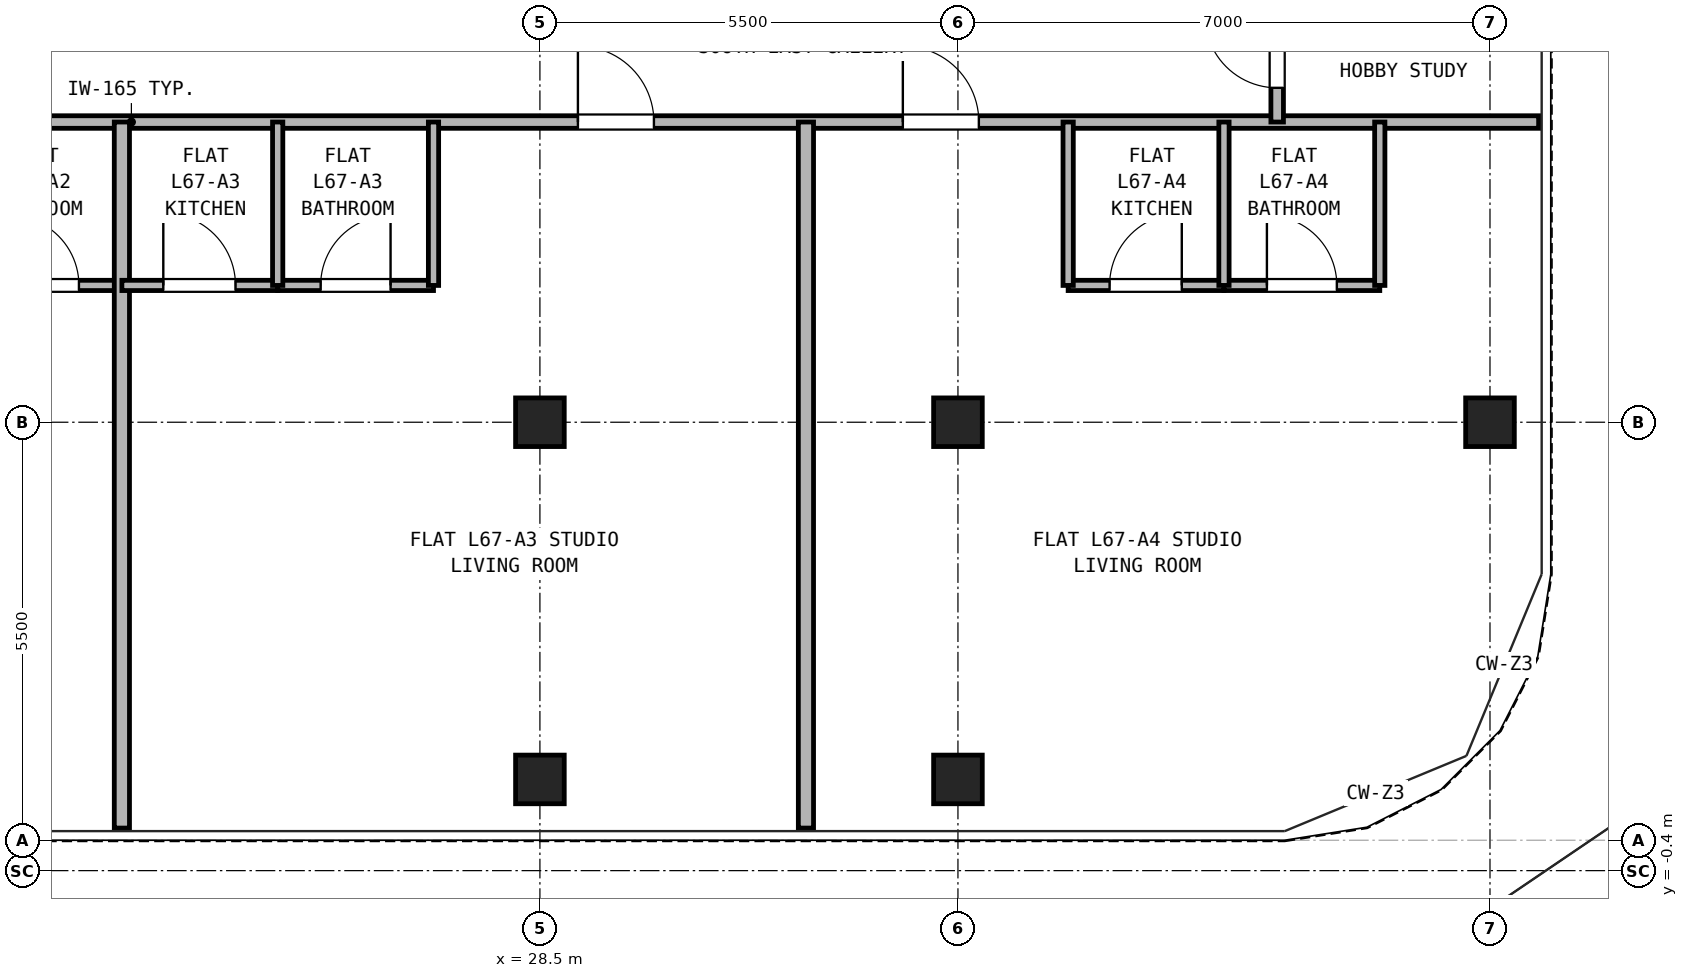
"""IFC4 building model, lengths in metres.
Left out: names, types, materials, properties, quantities, classifications, styles, units other than length and angle.
Written with IfcOpenShell. Run it as: python <this file> out.ifc"""

import sys

from ifc_helpers import new_model, si_unit, direction, frame, frame_2d, origin, origin_2d, place, context, subcontext, project, spatial, rectangle, hollow_rectangle, extrude, source, transform, mapped, element, fill, save


model = new_model("IFC4")
c1 = context("Model", 3, precision=1e-05, world=origin(), true_north=direction((0.0, 1.0)))
c2 = subcontext(c1, "Body", "Model", "MODEL_VIEW")
j1 = project(units=[si_unit("LENGTHUNIT", "METRE"), si_unit("PLANEANGLEUNIT", "RADIAN")], contexts=[c1])
p1 = place(None, origin())
s1 = spatial("IfcSite", under=j1, at=p1, CompositionType="ELEMENT")
p2 = place(p1, origin())
s2 = spatial("IfcBuilding", under=s1, at=p2, CompositionType="ELEMENT")
p3 = place(p2, frame((0.0, 0.0, 236.1)))
s3 = spatial("IfcBuildingStorey", under=s2, at=p3, CompositionType="ELEMENT", Elevation=236.1)
m1 = source(origin(), c2, "Body", "SweptSolid", [
    extrude(hollow_rectangle(XDim=0.64, YDim=0.64, WallThickness=0.035, at=origin_2d()), origin(), (0.0, 0.0, 1.0), 2.98),
])
for number, where, z_axis, x_axis in (
    (1, (28.5, 0.8, 0.0), (0.0, 0.0, 1.0), (1.0, 0.0, 0.0)),
    (2, (34.0, 0.8, 0.0), (0.0, 0.0, 1.0), (1.0, 0.0, 0.0)),
    (3, (41.0, 5.5, 0.0), (0.0, 0.0, 1.0), (1.0, 0.0, 0.0)),
    (4, (28.5, 5.5, 0.0), (0.0, 0.0, 1.0), (1.0, 0.0, 0.0)),
    (5, (34.0, 5.5, 0.0), (0.0, 0.0, 1.0), (1.0, 0.0, 0.0)),
):
    element("IfcColumn", number, at=place(p3, frame(where, z_axis=z_axis, x_axis=x_axis)), inside=s3, PredefinedType="COLUMN", context=c2, shape_type="MappedRepresentation", body=[
        mapped(m1, transform((0.0, 0.0, 0.0), x_axis=(1.0, 0.0, 0.0), y_axis=(0.0, 1.0, 0.0), z_axis=(0.0, 0.0, 1.0), scale=1.0)),
    ])
p4 = place(p3, frame((5.36, 9.45, 0.0), z_axis=(0.0, 0.0, 1.0), x_axis=(1.0, 0.0, 0.0)))
e6 = element("IfcWall", 6, at=p4, inside=s3, PredefinedType="PARTITIONING", context=c2, shape_type="SweptSolid", body=[
    extrude(rectangle(XDim=36.28, YDim=0.165, at=frame_2d((18.14, 0.0))), origin(), (0.0, 0.0, 1.0), 2.98),
])
p5 = place(p4, frame((7.115, 0.0, 0.0)))
e7 = element("IfcOpeningElement", 7, at=p5, cuts=e6, PredefinedType="OPENING", context=c2, shape_type="SweptSolid", body=[
    extrude(rectangle(XDim=1.0, YDim=2.15, at=frame_2d((0.5, 1.075))), frame((0.0, 0.093, 0.0), z_axis=(0.0, -1.0, 0.0), x_axis=(1.0, 0.0, 0.0)), (0.0, 0.0, 1.0), 0.185),
])
p6 = place(p4, frame((10.89, 0.0, 0.0)))
e8 = element("IfcOpeningElement", 8, at=p6, cuts=e6, PredefinedType="OPENING", context=c2, shape_type="SweptSolid", body=[
    extrude(rectangle(XDim=1.0, YDim=2.15, at=frame_2d((0.5, 1.075))), frame((0.0, 0.093, 0.0), z_axis=(0.0, -1.0, 0.0), x_axis=(1.0, 0.0, 0.0)), (0.0, 0.0, 1.0), 0.185),
])
p7 = place(p4, frame((23.64, 0.0, 0.0)))
e9 = element("IfcOpeningElement", 9, at=p7, cuts=e6, PredefinedType="OPENING", context=c2, shape_type="SweptSolid", body=[
    extrude(rectangle(XDim=1.0, YDim=2.15, at=frame_2d((0.5, 1.075))), frame((0.0, 0.093, 0.0), z_axis=(0.0, -1.0, 0.0), x_axis=(1.0, 0.0, 0.0)), (0.0, 0.0, 1.0), 0.185),
])
p8 = place(p4, frame((27.915, 0.0, 0.0)))
e10 = element("IfcOpeningElement", 10, at=p8, cuts=e6, PredefinedType="OPENING", context=c2, shape_type="SweptSolid", body=[
    extrude(rectangle(XDim=1.0, YDim=2.15, at=frame_2d((0.5, 1.075))), frame((0.0, 0.093, 0.0), z_axis=(0.0, -1.0, 0.0), x_axis=(1.0, 0.0, 0.0)), (0.0, 0.0, 1.0), 0.185),
])
p9 = place(p3, frame((38.2, 9.45, 0.0), z_axis=(0.0, 0.0, 1.0), x_axis=(0.0, 1.0, 0.0)))
e11 = element("IfcWall", 11, at=p9, inside=s3, PredefinedType="PARTITIONING", context=c2, shape_type="SweptSolid", body=[
    extrude(rectangle(XDim=2.0, YDim=0.165, at=frame_2d((1.0, 0.0))), origin(), (0.0, 0.0, 1.0), 2.98),
])
p10 = place(p9, frame((0.45, 0.0, 0.0)))
e12 = element("IfcOpeningElement", 12, at=p10, cuts=e11, PredefinedType="OPENING", context=c2, shape_type="SweptSolid", body=[
    extrude(rectangle(XDim=0.95, YDim=2.15, at=frame_2d((0.475, 1.075))), frame((0.0, 0.093, 0.0), z_axis=(0.0, -1.0, 0.0), x_axis=(1.0, 0.0, 0.0)), (0.0, 0.0, 1.0), 0.185),
])
p11 = place(p3, frame((20.95, 7.3, 0.0), z_axis=(0.0, 0.0, 1.0), x_axis=(1.0, 0.0, 0.0)))
e13 = element("IfcWall", 13, at=p11, inside=s3, PredefinedType="PARTITIONING", context=c2, shape_type="SweptSolid", body=[
    extrude(rectangle(XDim=2.05, YDim=0.135, at=frame_2d((1.025, 0.0))), origin(), (0.0, 0.0, 1.0), 2.98),
])
p12 = place(p11, frame((0.565, 0.0, 0.0)))
e14 = element("IfcOpeningElement", 14, at=p12, cuts=e13, PredefinedType="OPENING", context=c2, shape_type="SweptSolid", body=[
    extrude(rectangle(XDim=0.92, YDim=2.1, at=frame_2d((0.46, 1.05))), frame((0.0, 0.077, 0.0), z_axis=(0.0, -1.0, 0.0), x_axis=(1.0, 0.0, 0.0)), (0.0, 0.0, 1.0), 0.155),
])
p13 = place(p3, frame((23.0, 0.16, 0.0), z_axis=(0.0, 0.0, 1.0), x_axis=(0.0, 1.0, 0.0)))
e15 = element("IfcWall", 15, at=p13, inside=s3, PredefinedType="PARTITIONING", context=c2, shape_type="SweptSolid", body=[
    extrude(rectangle(XDim=9.29, YDim=0.2, at=frame_2d((4.645, 0.0))), origin(), (0.0, 0.0, 1.0), 2.98),
])
p14 = place(p3, frame((23.0, 7.3, 0.0), z_axis=(0.0, 0.0, 1.0), x_axis=(1.0, 0.0, 0.0)))
e16 = element("IfcWall", 16, at=p14, inside=s3, PredefinedType="PARTITIONING", context=c2, shape_type="SweptSolid", body=[
    extrude(rectangle(XDim=2.05, YDim=0.135, at=frame_2d((1.025, 0.0))), origin(), (0.0, 0.0, 1.0), 2.98),
])
p15 = place(p14, frame((0.545, 0.0, 0.0)))
e17 = element("IfcOpeningElement", 17, at=p15, cuts=e16, PredefinedType="OPENING", context=c2, shape_type="SweptSolid", body=[
    extrude(rectangle(XDim=0.95, YDim=2.15, at=frame_2d((0.475, 1.075))), frame((0.0, 0.077, 0.0), z_axis=(0.0, -1.0, 0.0), x_axis=(1.0, 0.0, 0.0)), (0.0, 0.0, 1.0), 0.155),
])
p16 = place(p3, frame((25.05, 7.3, 0.0), z_axis=(0.0, 0.0, 1.0), x_axis=(1.0, 0.0, 0.0)))
e18 = element("IfcWall", 18, at=p16, inside=s3, PredefinedType="PARTITIONING", context=c2, shape_type="SweptSolid", body=[
    extrude(rectangle(XDim=2.05, YDim=0.135, at=frame_2d((1.025, 0.0))), origin(), (0.0, 0.0, 1.0), 2.98),
])
p17 = place(p16, frame((0.565, 0.0, 0.0)))
e19 = element("IfcOpeningElement", 19, at=p17, cuts=e18, PredefinedType="OPENING", context=c2, shape_type="SweptSolid", body=[
    extrude(rectangle(XDim=0.92, YDim=2.1, at=frame_2d((0.46, 1.05))), frame((0.0, 0.077, 0.0), z_axis=(0.0, -1.0, 0.0), x_axis=(1.0, 0.0, 0.0)), (0.0, 0.0, 1.0), 0.155),
])
for number, where, z_axis, x_axis in (
    (20, (25.05, 7.3, 0.0), (0.0, 0.0, 1.0), (0.0, 1.0, 0.0)),
    (21, (27.1, 7.3, 0.0), (0.0, 0.0, 1.0), (0.0, 1.0, 0.0)),
):
    element("IfcWall", number, at=place(p3, frame(where, z_axis=z_axis, x_axis=x_axis)), inside=s3, PredefinedType="PARTITIONING", context=c2, shape_type="SweptSolid", body=[
        extrude(rectangle(XDim=2.15, YDim=0.135, at=frame_2d((1.075, 0.0))), origin(), (0.0, 0.0, 1.0), 2.98),
    ])
p18 = place(p3, frame((32.0, 0.16, 0.0), z_axis=(0.0, 0.0, 1.0), x_axis=(0.0, 1.0, 0.0)))
e22 = element("IfcWall", 22, at=p18, inside=s3, PredefinedType="PARTITIONING", context=c2, shape_type="SweptSolid", body=[
    extrude(rectangle(XDim=9.29, YDim=0.2, at=frame_2d((4.645, 0.0))), origin(), (0.0, 0.0, 1.0), 2.98),
])
p19 = place(p3, frame((35.45, 7.3, 0.0), z_axis=(0.0, 0.0, 1.0), x_axis=(1.0, 0.0, 0.0)))
e23 = element("IfcWall", 23, at=p19, inside=s3, PredefinedType="PARTITIONING", context=c2, shape_type="SweptSolid", body=[
    extrude(rectangle(XDim=2.05, YDim=0.135, at=frame_2d((1.025, 0.0))), origin(), (0.0, 0.0, 1.0), 2.98),
])
p20 = place(p19, frame((0.545, 0.0, 0.0)))
e24 = element("IfcOpeningElement", 24, at=p20, cuts=e23, PredefinedType="OPENING", context=c2, shape_type="SweptSolid", body=[
    extrude(rectangle(XDim=0.95, YDim=2.15, at=frame_2d((0.475, 1.075))), frame((0.0, 0.077, 0.0), z_axis=(0.0, -1.0, 0.0), x_axis=(1.0, 0.0, 0.0)), (0.0, 0.0, 1.0), 0.155),
])
p21 = place(p3, frame((37.5, 7.3, 0.0), z_axis=(0.0, 0.0, 1.0), x_axis=(1.0, 0.0, 0.0)))
e25 = element("IfcWall", 25, at=p21, inside=s3, PredefinedType="PARTITIONING", context=c2, shape_type="SweptSolid", body=[
    extrude(rectangle(XDim=2.05, YDim=0.135, at=frame_2d((1.025, 0.0))), origin(), (0.0, 0.0, 1.0), 2.98),
])
p22 = place(p21, frame((0.565, 0.0, 0.0)))
e26 = element("IfcOpeningElement", 26, at=p22, cuts=e25, PredefinedType="OPENING", context=c2, shape_type="SweptSolid", body=[
    extrude(rectangle(XDim=0.92, YDim=2.1, at=frame_2d((0.46, 1.05))), frame((0.0, 0.077, 0.0), z_axis=(0.0, -1.0, 0.0), x_axis=(1.0, 0.0, 0.0)), (0.0, 0.0, 1.0), 0.155),
])
for number, where, z_axis, x_axis in (
    (27, (35.45, 7.3, 0.0), (0.0, 0.0, 1.0), (0.0, 1.0, 0.0)),
    (28, (37.5, 7.3, 0.0), (0.0, 0.0, 1.0), (0.0, 1.0, 0.0)),
    (29, (39.55, 7.3, 0.0), (0.0, 0.0, 1.0), (0.0, 1.0, 0.0)),
):
    element("IfcWall", number, at=place(p3, frame(where, z_axis=z_axis, x_axis=x_axis)), inside=s3, PredefinedType="PARTITIONING", context=c2, shape_type="SweptSolid", body=[
        extrude(rectangle(XDim=2.15, YDim=0.135, at=frame_2d((1.075, 0.0))), origin(), (0.0, 0.0, 1.0), 2.98),
    ])
p23 = place(p12, origin())
e30 = element("IfcDoor", 30, at=p23, inside=s3, OperationType="SINGLE_SWING_LEFT", PredefinedType="DOOR", context=c2, shape_type="SweptSolid", body=[
    extrude(rectangle(XDim=0.92, YDim=2.1, at=frame_2d((0.46, 1.05))), frame((0.0, 0.025, 0.0), z_axis=(0.0, -1.0, 0.0), x_axis=(1.0, 0.0, 0.0)), (0.0, 0.0, 1.0), 0.05),
])
fill(e14, e30)
p24 = place(p15, origin())
e31 = element("IfcDoor", 31, at=p24, inside=s3, OperationType="SINGLE_SWING_LEFT", PredefinedType="DOOR", context=c2, shape_type="SweptSolid", body=[
    extrude(rectangle(XDim=0.95, YDim=2.15, at=frame_2d((0.475, 1.075))), frame((0.0, 0.025, 0.0), z_axis=(0.0, -1.0, 0.0), x_axis=(1.0, 0.0, 0.0)), (0.0, 0.0, 1.0), 0.05),
])
fill(e17, e31)
p25 = place(p17, origin())
e32 = element("IfcDoor", 32, at=p25, inside=s3, OperationType="SINGLE_SWING_RIGHT", PredefinedType="DOOR", context=c2, shape_type="SweptSolid", body=[
    extrude(rectangle(XDim=0.92, YDim=2.1, at=frame_2d((0.46, 1.05))), frame((0.0, 0.025, 0.0), z_axis=(0.0, -1.0, 0.0), x_axis=(1.0, 0.0, 0.0)), (0.0, 0.0, 1.0), 0.05),
])
fill(e19, e32)
p26 = place(p7, frame((1.0, 0.0, 0.0), z_axis=(0.0, 0.0, 1.0), x_axis=(-1.0, 0.0, 0.0)))
e33 = element("IfcDoor", 33, at=p26, inside=s3, OperationType="SINGLE_SWING_LEFT", PredefinedType="DOOR", context=c2, shape_type="SweptSolid", body=[
    extrude(rectangle(XDim=1.0, YDim=2.15, at=frame_2d((0.5, 1.075))), frame((0.0, 0.025, 0.0), z_axis=(0.0, -1.0, 0.0), x_axis=(1.0, 0.0, 0.0)), (0.0, 0.0, 1.0), 0.05),
])
fill(e9, e33)
p27 = place(p20, origin())
e34 = element("IfcDoor", 34, at=p27, inside=s3, OperationType="SINGLE_SWING_RIGHT", PredefinedType="DOOR", context=c2, shape_type="SweptSolid", body=[
    extrude(rectangle(XDim=0.95, YDim=2.15, at=frame_2d((0.475, 1.075))), frame((0.0, 0.025, 0.0), z_axis=(0.0, -1.0, 0.0), x_axis=(1.0, 0.0, 0.0)), (0.0, 0.0, 1.0), 0.05),
])
fill(e24, e34)
p28 = place(p22, origin())
e35 = element("IfcDoor", 35, at=p28, inside=s3, OperationType="SINGLE_SWING_LEFT", PredefinedType="DOOR", context=c2, shape_type="SweptSolid", body=[
    extrude(rectangle(XDim=0.92, YDim=2.1, at=frame_2d((0.46, 1.05))), frame((0.0, 0.025, 0.0), z_axis=(0.0, -1.0, 0.0), x_axis=(1.0, 0.0, 0.0)), (0.0, 0.0, 1.0), 0.05),
])
fill(e26, e35)
p29 = place(p8, frame((1.0, 0.0, 0.0), z_axis=(0.0, 0.0, 1.0), x_axis=(-1.0, 0.0, 0.0)))
e36 = element("IfcDoor", 36, at=p29, inside=s3, OperationType="SINGLE_SWING_LEFT", PredefinedType="DOOR", context=c2, shape_type="SweptSolid", body=[
    extrude(rectangle(XDim=1.0, YDim=2.15, at=frame_2d((0.5, 1.075))), frame((0.0, 0.025, 0.0), z_axis=(0.0, -1.0, 0.0), x_axis=(1.0, 0.0, 0.0)), (0.0, 0.0, 1.0), 0.05),
])
fill(e10, e36)
p30 = place(p10, origin())
e37 = element("IfcDoor", 37, at=p30, inside=s3, OperationType="SINGLE_SWING_RIGHT", PredefinedType="DOOR", context=c2, shape_type="SweptSolid", body=[
    extrude(rectangle(XDim=0.95, YDim=2.15, at=frame_2d((0.475, 1.075))), frame((0.0, 0.025, 0.0), z_axis=(0.0, -1.0, 0.0), x_axis=(1.0, 0.0, 0.0)), (0.0, 0.0, 1.0), 0.05),
])
fill(e12, e37)
save(model, sys.argv[1])
